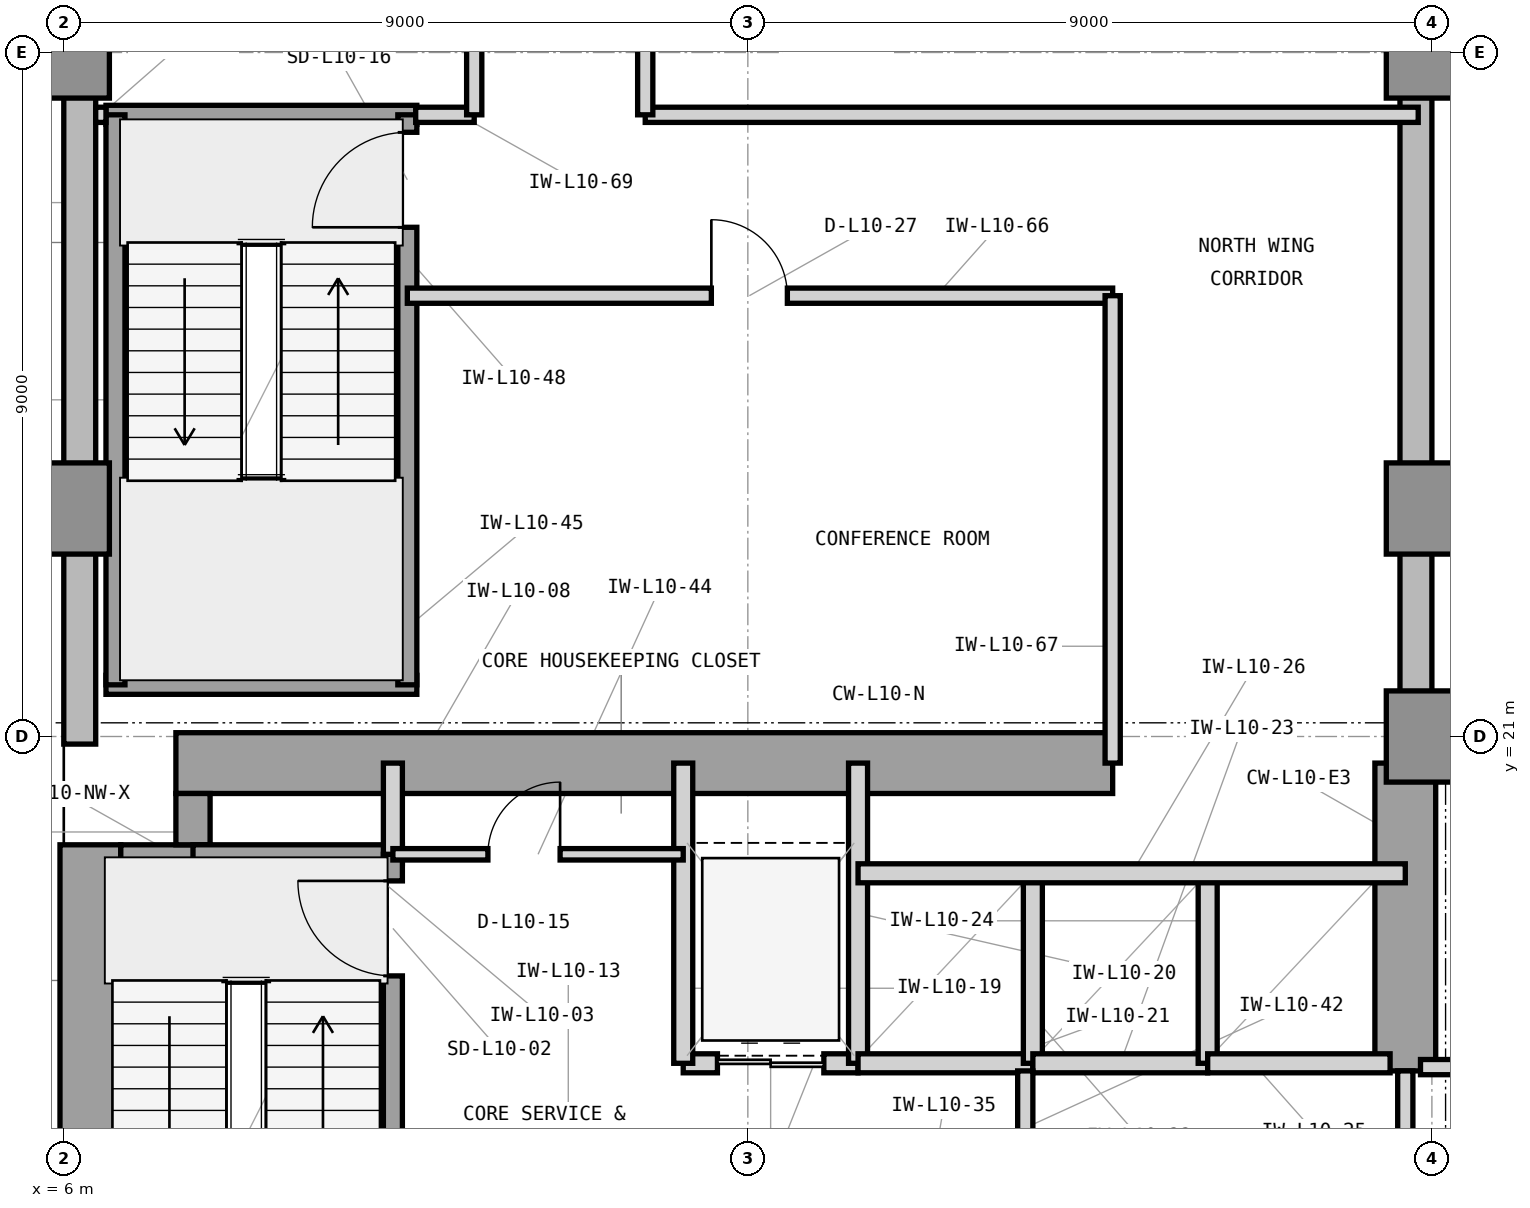
"""IFC4 building model, lengths in metres.
Left out: names, types, materials, properties, quantities, classifications, styles, units other than length and angle.
Written with IfcOpenShell. Run it as: python <this file> out.ifc"""

import sys

from ifc_helpers import new_model, si_unit, direction, frame, frame_2d, origin, origin_2d, place, context, subcontext, project, spatial, rectangle, extrude, element, fill, save


model = new_model("IFC4")
c1 = context("Model", 3, precision=1e-05, world=origin(), true_north=direction((0.0, 1.0)))
c2 = subcontext(c1, "Body", "Model", "MODEL_VIEW")
j1 = project(units=[si_unit("LENGTHUNIT", "METRE"), si_unit("PLANEANGLEUNIT", "RADIAN")], contexts=[c1])
p1 = place(None, origin())
s1 = spatial("IfcSite", under=j1, at=p1, CompositionType="ELEMENT")
p2 = place(p1, origin())
s2 = spatial("IfcBuilding", under=s1, at=p2, CompositionType="ELEMENT")
p3 = place(p2, frame((0.0, 0.0, 46.8)))
s3 = spatial("IfcBuildingStorey", under=s2, at=p3, CompositionType="ELEMENT", Elevation=46.8)
p4 = place(p3, frame((6.35, 4.425, 0.0), z_axis=(0.0, 0.0, 1.0), x_axis=(0.0, 1.0, 0.0)))
e1 = element("IfcWall", 1, at=p4, inside=s3, PredefinedType="SHEAR", context=c2, shape_type="SweptSolid", body=[
    extrude(rectangle(XDim=15.15, YDim=0.8, at=frame_2d((7.575, 0.0))), origin(), (0.0, 0.0, 1.0), 4.2),
])
p5 = place(p3, frame((7.475, 20.65, 0.0), z_axis=(0.0, 0.0, 1.0), x_axis=(1.0, 0.0, 0.0)))
e2 = element("IfcWall", 2, at=p5, inside=s3, PredefinedType="SHEAR", context=c2, shape_type="SweptSolid", body=[
    extrude(rectangle(XDim=12.325, YDim=0.8, at=frame_2d((6.163, 0.0))), origin(), (0.0, 0.0, 1.0), 4.2),
])
p6 = place(p3, frame((23.65, 16.6, 0.0), z_axis=(0.0, 0.0, 1.0), x_axis=(0.0, 1.0, 0.0)))
e3 = element("IfcWall", 3, at=p6, inside=s3, PredefinedType="SHEAR", context=c2, shape_type="SweptSolid", body=[
    extrude(rectangle(XDim=4.05, YDim=0.8, at=frame_2d((2.025, 0.0))), origin(), (0.0, 0.0, 1.0), 4.2),
])
p7 = place(p3, frame((6.75, 19.35, 0.0), z_axis=(0.0, 0.0, 1.0), x_axis=(1.0, 0.0, 0.0)))
e4 = element("IfcWall", 4, at=p7, inside=s3, PredefinedType="SHEAR", context=c2, shape_type="SweptSolid", body=[
    extrude(rectangle(XDim=1.175, YDim=0.45, at=frame_2d((0.587, 0.0))), origin(), (0.0, 0.0, 1.0), 4.2),
])
p8 = place(p3, frame((7.7, 19.575, 0.0), z_axis=(0.0, 0.0, 1.0), x_axis=(0.0, 1.0, 0.0)))
e5 = element("IfcWall", 5, at=p8, inside=s3, PredefinedType="SHEAR", context=c2, shape_type="SweptSolid", body=[
    extrude(rectangle(XDim=0.675, YDim=0.45, at=frame_2d((0.337, 0.0))), origin(), (0.0, 0.0, 1.0), 4.2),
])
for number, where, z_axis, x_axis in (
    (6, (24.0, 21.0, 0.0), (0.0, 0.0, 1.0), (1.0, 0.0, 0.0)),
    (7, (6.0, 24.0, 0.0), (0.0, 0.0, 1.0), (1.0, 0.0, 0.0)),
    (8, (24.0, 24.0, 0.0), (0.0, 0.0, 1.0), (1.0, 0.0, 0.0)),
    (9, (6.0, 30.0, 0.0), (0.0, 0.0, 1.0), (1.0, 0.0, 0.0)),
    (10, (24.0, 30.0, 0.0), (0.0, 0.0, 1.0), (1.0, 0.0, 0.0)),
):
    element("IfcColumn", number, at=place(p3, frame(where, z_axis=z_axis, x_axis=x_axis)), inside=s3, PredefinedType="COLUMN", context=c2, shape_type="SweptSolid", body=[
        extrude(rectangle(XDim=1.2, YDim=1.2, at=origin_2d()), origin(), (0.0, 0.0, 1.0), 4.2),
    ])
p9 = place(p3, frame((64.4, 20.79, 0.0), z_axis=(0.0, 0.0, 1.0), x_axis=(-1.0, 0.0, 0.0)))
e11 = element("IfcWall", 11, at=p9, inside=s3, PredefinedType="STANDARD", context=c2, shape_type="SweptSolid", body=[
    extrude(rectangle(XDim=40.4, YDim=0.42, at=frame_2d((20.2, 0.0))), origin(), (0.0, 0.0, 1.0), 3.98),
])
p10 = place(p9, frame((26.375, 0.0, 0.85)))
e12 = element("IfcOpeningElement", 12, at=p10, cuts=e11, PredefinedType="OPENING", context=c2, shape_type="SweptSolid", body=[
    extrude(rectangle(XDim=2.8, YDim=2.45, at=frame_2d((1.4, 1.225))), frame((0.0, 0.22, 0.0), z_axis=(0.0, -1.0, 0.0), x_axis=(1.0, 0.0, 0.0)), (0.0, 0.0, 1.0), 0.44),
])
p11 = place(p9, frame((38.222, 0.0, 0.85)))
e13 = element("IfcOpeningElement", 13, at=p11, cuts=e11, PredefinedType="OPENING", context=c2, shape_type="SweptSolid", body=[
    extrude(rectangle(XDim=1.2, YDim=2.45, at=frame_2d((0.6, 1.225))), frame((0.0, 0.22, 0.0), z_axis=(0.0, -1.0, 0.0), x_axis=(1.0, 0.0, 0.0)), (0.0, 0.0, 1.0), 0.44),
])
p12 = place(p9, frame((32.536, 0.0, 0.85)))
e14 = element("IfcOpeningElement", 14, at=p12, cuts=e11, PredefinedType="OPENING", context=c2, shape_type="SweptSolid", body=[
    extrude(rectangle(XDim=2.8, YDim=2.45, at=frame_2d((1.4, 1.225))), frame((0.0, 0.22, 0.0), z_axis=(0.0, -1.0, 0.0), x_axis=(1.0, 0.0, 0.0)), (0.0, 0.0, 1.0), 0.44),
])
p13 = place(p9, frame((17.386, 0.0, 0.85)))
e15 = element("IfcOpeningElement", 15, at=p13, cuts=e11, PredefinedType="OPENING", context=c2, shape_type="SweptSolid", body=[
    extrude(rectangle(XDim=2.8, YDim=2.45, at=frame_2d((1.4, 1.225))), frame((0.0, 0.22, 0.0), z_axis=(0.0, -1.0, 0.0), x_axis=(1.0, 0.0, 0.0)), (0.0, 0.0, 1.0), 0.44),
])
p14 = place(p3, frame((23.79, 21.0, 0.0), z_axis=(0.0, 0.0, 1.0), x_axis=(0.0, 1.0, 0.0)))
e16 = element("IfcWall", 16, at=p14, inside=s3, PredefinedType="STANDARD", context=c2, shape_type="SweptSolid", body=[
    extrude(rectangle(XDim=28.4, YDim=0.42, at=frame_2d((14.2, 0.0))), origin(), (0.0, 0.0, 1.0), 3.98),
])
p15 = place(p14, frame((10.433, 0.0, 0.85)))
e17 = element("IfcOpeningElement", 17, at=p15, cuts=e16, PredefinedType="OPENING", context=c2, shape_type="SweptSolid", body=[
    extrude(rectangle(XDim=2.8, YDim=2.45, at=frame_2d((1.4, 1.225))), frame((0.0, 0.22, 0.0), z_axis=(0.0, -1.0, 0.0), x_axis=(1.0, 0.0, 0.0)), (0.0, 0.0, 1.0), 0.44),
])
p16 = place(p14, frame((16.016, 0.0, 0.85)))
e18 = element("IfcOpeningElement", 18, at=p16, cuts=e16, PredefinedType="OPENING", context=c2, shape_type="SweptSolid", body=[
    extrude(rectangle(XDim=1.2, YDim=2.45, at=frame_2d((0.6, 1.225))), frame((0.0, 0.22, 0.0), z_axis=(0.0, -1.0, 0.0), x_axis=(1.0, 0.0, 0.0)), (0.0, 0.0, 1.0), 0.44),
])
p17 = place(p3, frame((6.21, 49.4, 0.0), z_axis=(0.0, 0.0, 1.0), x_axis=(0.0, -1.0, 0.0)))
e19 = element("IfcWall", 19, at=p17, inside=s3, PredefinedType="STANDARD", context=c2, shape_type="SweptSolid", body=[
    extrude(rectangle(XDim=28.5, YDim=0.42, at=frame_2d((14.25, 0.0))), origin(), (0.0, 0.0, 1.0), 3.98),
])
p18 = place(p17, frame((15.225, 0.0, 0.85)))
e20 = element("IfcOpeningElement", 20, at=p18, cuts=e19, PredefinedType="OPENING", context=c2, shape_type="SweptSolid", body=[
    extrude(rectangle(XDim=2.8, YDim=2.45, at=frame_2d((1.4, 1.225))), frame((0.0, 0.22, 0.0), z_axis=(0.0, -1.0, 0.0), x_axis=(1.0, 0.0, 0.0)), (0.0, 0.0, 1.0), 0.44),
])
p19 = place(p3, frame((7.7, 19.45, 0.0), z_axis=(0.0, 0.0, 1.0), x_axis=(1.0, 0.0, 0.0)))
e21 = element("IfcWall", 21, at=p19, inside=s3, PredefinedType="SHEAR", context=c2, shape_type="SweptSolid", body=[
    extrude(rectangle(XDim=2.755, YDim=0.25, at=frame_2d((1.377, 0.0))), origin(), (0.0, 0.0, 1.0), 4.2),
])
p20 = place(p3, frame((10.33, 12.0, 0.0), z_axis=(0.0, 0.0, 1.0), x_axis=(0.0, 1.0, 0.0)))
e22 = element("IfcWall", 22, at=p20, inside=s3, PredefinedType="SHEAR", context=c2, shape_type="SweptSolid", body=[
    extrude(rectangle(XDim=7.45, YDim=0.25, at=frame_2d((3.725, 0.0))), origin(), (0.0, 0.0, 1.0), 4.2),
])
p21 = place(p20, frame((5.85, 0.0, 0.0)))
e23 = element("IfcOpeningElement", 23, at=p21, cuts=e22, PredefinedType="OPENING", context=c2, shape_type="SweptSolid", body=[
    extrude(rectangle(XDim=1.25, YDim=2.2, at=frame_2d((0.625, 1.1))), frame((0.0, 0.135, 0.0), z_axis=(0.0, -1.0, 0.0), x_axis=(1.0, 0.0, 0.0)), (0.0, 0.0, 1.0), 0.27),
])
p22 = place(p3, frame((10.33, 19.45, 0.0), z_axis=(0.0, 0.0, 1.0), x_axis=(0.0, 1.0, 0.0)))
e24 = element("IfcWall", 24, at=p22, inside=s3, PredefinedType="PARTITIONING", context=c2, shape_type="SweptSolid", body=[
    extrude(rectangle(XDim=1.2, YDim=0.25, at=frame_2d((0.6, 0.0))), origin(), (0.0, 0.0, 1.0), 3.114),
])
p23 = place(p3, frame((14.15, 16.7, 0.0), z_axis=(0.0, 0.0, 1.0), x_axis=(1.0, 0.0, 0.0)))
e25 = element("IfcWall", 25, at=p23, inside=s3, PredefinedType="PARTITIONING", context=c2, shape_type="SweptSolid", body=[
    extrude(rectangle(XDim=2.3, YDim=0.25, at=frame_2d((1.15, 0.0))), origin(), (0.0, 0.0, 1.0), 3.426),
])
p24 = place(p23, frame((0.45, 0.0, 0.0)))
e26 = element("IfcOpeningElement", 26, at=p24, cuts=e25, PredefinedType="OPENING", context=c2, shape_type="SweptSolid", body=[
    extrude(rectangle(XDim=1.4, YDim=2.35, at=frame_2d((0.7, 1.175))), frame((0.0, 0.135, 0.0), z_axis=(0.0, -1.0, 0.0), x_axis=(1.0, 0.0, 0.0)), (0.0, 0.0, 1.0), 0.27),
])
for number, where, z_axis, x_axis in (
    (27, (14.15, 16.7, 0.0), (0.0, 0.0, 1.0), (0.0, 1.0, 0.0)),
    (28, (16.45, 16.7, 0.0), (0.0, 0.0, 1.0), (0.0, 1.0, 0.0)),
):
    element("IfcWall", number, at=place(p3, frame(where, z_axis=z_axis, x_axis=x_axis)), inside=s3, PredefinedType="PARTITIONING", context=c2, shape_type="SweptSolid", body=[
        extrude(rectangle(XDim=3.95, YDim=0.25, at=frame_2d((1.975, 0.0))), origin(), (0.0, 0.0, 1.0), 3.97),
    ])
p25 = place(p3, frame((16.45, 16.7, 0.0), z_axis=(0.0, 0.0, 1.0), x_axis=(1.0, 0.0, 0.0)))
e29 = element("IfcWall", 29, at=p25, inside=s3, PredefinedType="PARTITIONING", context=c2, shape_type="SweptSolid", body=[
    extrude(rectangle(XDim=2.3, YDim=0.25, at=frame_2d((1.15, 0.0))), origin(), (0.0, 0.0, 1.0), 3.426),
])
p26 = place(p3, frame((18.75, 16.7, 0.0), z_axis=(0.0, 0.0, 1.0), x_axis=(0.0, 1.0, 0.0)))
e30 = element("IfcWall", 30, at=p26, inside=s3, PredefinedType="PARTITIONING", context=c2, shape_type="SweptSolid", body=[
    extrude(rectangle(XDim=2.5, YDim=0.25, at=frame_2d((1.25, 0.0))), origin(), (0.0, 0.0, 1.0), 3.97),
])
p27 = place(p3, frame((18.75, 16.7, 0.0), z_axis=(0.0, 0.0, 1.0), x_axis=(1.0, 0.0, 0.0)))
e31 = element("IfcWall", 31, at=p27, inside=s3, PredefinedType="PARTITIONING", context=c2, shape_type="SweptSolid", body=[
    extrude(rectangle(XDim=2.3, YDim=0.25, at=frame_2d((1.15, 0.0))), origin(), (0.0, 0.0, 1.0), 3.426),
])
p28 = place(p3, frame((21.05, 16.7, 0.0), z_axis=(0.0, 0.0, 1.0), x_axis=(0.0, 1.0, 0.0)))
e32 = element("IfcWall", 32, at=p28, inside=s3, PredefinedType="PARTITIONING", context=c2, shape_type="SweptSolid", body=[
    extrude(rectangle(XDim=2.5, YDim=0.25, at=frame_2d((1.25, 0.0))), origin(), (0.0, 0.0, 1.0), 3.97),
])
p29 = place(p3, frame((21.05, 16.7, 0.0), z_axis=(0.0, 0.0, 1.0), x_axis=(1.0, 0.0, 0.0)))
e33 = element("IfcWall", 33, at=p29, inside=s3, PredefinedType="PARTITIONING", context=c2, shape_type="SweptSolid", body=[
    extrude(rectangle(XDim=2.4, YDim=0.25, at=frame_2d((1.2, 0.0))), origin(), (0.0, 0.0, 1.0), 3.426),
])
p30 = place(p3, frame((16.45, 19.2, 0.0), z_axis=(0.0, 0.0, 1.0), x_axis=(1.0, 0.0, 0.0)))
e34 = element("IfcWall", 34, at=p30, inside=s3, PredefinedType="PARTITIONING", context=c2, shape_type="SweptSolid", body=[
    extrude(rectangle(XDim=7.2, YDim=0.25, at=frame_2d((3.6, 0.0))), origin(), (0.0, 0.0, 1.0), 3.97),
])
p31 = place(p3, frame((18.65, 13.6, 0.0), z_axis=(0.0, 0.0, 1.0), x_axis=(0.0, 1.0, 0.0)))
e35 = element("IfcWall", 35, at=p31, inside=s3, PredefinedType="PARTITIONING", context=c2, shape_type="SweptSolid", body=[
    extrude(rectangle(XDim=3.0, YDim=0.2, at=frame_2d((1.5, 0.0))), origin(), (0.0, 0.0, 1.0), 3.97),
])
p32 = place(p31, frame((1.02, 0.0, 0.0)))
e36 = element("IfcOpeningElement", 36, at=p32, cuts=e35, PredefinedType="OPENING", context=c2, shape_type="SweptSolid", body=[
    extrude(rectangle(XDim=0.95, YDim=2.1, at=frame_2d((0.475, 1.05))), frame((0.0, 0.11, 0.0), z_axis=(0.0, -1.0, 0.0), x_axis=(1.0, 0.0, 0.0)), (0.0, 0.0, 1.0), 0.22),
])
p33 = place(p3, frame((23.65, 13.6, 0.0), z_axis=(0.0, 0.0, 1.0), x_axis=(0.0, 1.0, 0.0)))
e37 = element("IfcWall", 37, at=p33, inside=s3, PredefinedType="PARTITIONING", context=c2, shape_type="SweptSolid", body=[
    extrude(rectangle(XDim=3.0, YDim=0.2, at=frame_2d((1.5, 0.0))), origin(), (0.0, 0.0, 1.0), 3.97),
])
p34 = place(p3, frame((10.33, 19.45, 0.0), z_axis=(0.0, 0.0, 1.0), x_axis=(1.0, 0.0, 0.0)))
e38 = element("IfcWall", 38, at=p34, inside=s3, PredefinedType="PARTITIONING", context=c2, shape_type="SweptSolid", body=[
    extrude(rectangle(XDim=3.82, YDim=0.15, at=frame_2d((1.91, 0.0))), origin(), (0.0, 0.0, 1.0), 3.97),
])
p35 = place(p34, frame((1.25, 0.0, 0.0)))
e39 = element("IfcOpeningElement", 39, at=p35, cuts=e38, PredefinedType="OPENING", context=c2, shape_type="SweptSolid", body=[
    extrude(rectangle(XDim=0.95, YDim=2.1, at=frame_2d((0.475, 1.05))), frame((0.0, 0.085, 0.0), z_axis=(0.0, -1.0, 0.0), x_axis=(1.0, 0.0, 0.0)), (0.0, 0.0, 1.0), 0.17),
])
for number, where, z_axis, x_axis in (
    (40, (6.555, 21.68, 0.0), (0.0, 0.0, 1.0), (1.0, 0.0, 0.0)),
    (41, (6.555, 29.18, 0.0), (0.0, 0.0, 1.0), (1.0, 0.0, 0.0)),
):
    element("IfcWall", number, at=place(p3, frame(where, z_axis=z_axis, x_axis=x_axis)), inside=s3, PredefinedType="SHEAR", context=c2, shape_type="SweptSolid", body=[
        extrude(rectangle(XDim=4.09, YDim=0.25, at=frame_2d((2.045, 0.0))), origin(), (0.0, 0.0, 1.0), 4.2),
    ])
p36 = place(p3, frame((6.68, 21.68, 0.0), z_axis=(0.0, 0.0, 1.0), x_axis=(0.0, 1.0, 0.0)))
e42 = element("IfcWall", 42, at=p36, inside=s3, PredefinedType="SHEAR", context=c2, shape_type="SweptSolid", body=[
    extrude(rectangle(XDim=7.5, YDim=0.25, at=frame_2d((3.75, 0.0))), origin(), (0.0, 0.0, 1.0), 4.2),
])
p37 = place(p3, frame((10.52, 21.68, 0.0), z_axis=(0.0, 0.0, 1.0), x_axis=(0.0, 1.0, 0.0)))
e43 = element("IfcWall", 43, at=p37, inside=s3, PredefinedType="SHEAR", context=c2, shape_type="SweptSolid", body=[
    extrude(rectangle(XDim=7.5, YDim=0.25, at=frame_2d((3.75, 0.0))), origin(), (0.0, 0.0, 1.0), 4.2),
])
p38 = place(p37, frame((6.02, 0.0, 0.0)))
e44 = element("IfcOpeningElement", 44, at=p38, cuts=e43, PredefinedType="OPENING", context=c2, shape_type="SweptSolid", body=[
    extrude(rectangle(XDim=1.25, YDim=2.2, at=frame_2d((0.625, 1.1))), frame((0.0, 0.135, 0.0), z_axis=(0.0, -1.0, 0.0), x_axis=(1.0, 0.0, 0.0)), (0.0, 0.0, 1.0), 0.27),
])
p39 = place(p3, frame((23.85, 16.65, 0.0), z_axis=(0.0, 0.0, 1.0), x_axis=(1.0, 0.0, 0.0)))
e45 = element("IfcWall", 45, at=p39, inside=s3, PredefinedType="PARTITIONING", context=c2, shape_type="SweptSolid", body=[
    extrude(rectangle(XDim=2.85, YDim=0.2, at=frame_2d((1.425, 0.0))), origin(), (0.0, 0.0, 1.0), 3.97),
])
p40 = place(p39, frame((0.7, 0.0, 0.0)))
e46 = element("IfcOpeningElement", 46, at=p40, cuts=e45, PredefinedType="OPENING", context=c2, shape_type="SweptSolid", body=[
    extrude(rectangle(XDim=1.0, YDim=2.15, at=frame_2d((0.5, 1.075))), frame((0.0, 0.11, 0.0), z_axis=(0.0, -1.0, 0.0), x_axis=(1.0, 0.0, 0.0)), (0.0, 0.0, 1.0), 0.22),
])
p41 = place(p3, frame((10.52, 26.8, 0.0), z_axis=(0.0, 0.0, 1.0), x_axis=(1.0, 0.0, 0.0)))
e47 = element("IfcWall", 47, at=p41, inside=s3, PredefinedType="PARTITIONING", context=c2, shape_type="SweptSolid", body=[
    extrude(rectangle(XDim=9.28, YDim=0.2, at=frame_2d((4.64, 0.0))), origin(), (0.0, 0.0, 1.0), 3.97),
])
p42 = place(p41, frame((4.0, 0.0, 0.0)))
e48 = element("IfcOpeningElement", 48, at=p42, cuts=e47, PredefinedType="OPENING", context=c2, shape_type="SweptSolid", body=[
    extrude(rectangle(XDim=1.0, YDim=2.15, at=frame_2d((0.5, 1.075))), frame((0.0, 0.11, 0.0), z_axis=(0.0, -1.0, 0.0), x_axis=(1.0, 0.0, 0.0)), (0.0, 0.0, 1.0), 0.22),
])
p43 = place(p3, frame((19.8, 20.65, 0.0), z_axis=(0.0, 0.0, 1.0), x_axis=(0.0, 1.0, 0.0)))
e49 = element("IfcWall", 49, at=p43, inside=s3, PredefinedType="PARTITIONING", context=c2, shape_type="SweptSolid", body=[
    extrude(rectangle(XDim=6.15, YDim=0.2, at=frame_2d((3.075, 0.0))), origin(), (0.0, 0.0, 1.0), 3.97),
])
p44 = place(p3, frame((6.42, 29.18, 0.0), z_axis=(0.0, 0.0, 1.0), x_axis=(1.0, 0.0, 0.0)))
e50 = element("IfcWall", 50, at=p44, inside=s3, PredefinedType="PARTITIONING", context=c2, shape_type="SweptSolid", body=[
    extrude(rectangle(XDim=0.135, YDim=0.2, at=frame_2d((0.067, 0.0))), origin(), (0.0, 0.0, 1.0), 3.97),
])
p45 = place(p3, frame((10.63, 29.18, 0.0), z_axis=(0.0, 0.0, 1.0), x_axis=(1.0, 0.0, 0.0)))
e51 = element("IfcWall", 51, at=p45, inside=s3, PredefinedType="PARTITIONING", context=c2, shape_type="SweptSolid", body=[
    extrude(rectangle(XDim=0.77, YDim=0.2, at=frame_2d((0.385, 0.0))), origin(), (0.0, 0.0, 1.0), 3.97),
])
p46 = place(p3, frame((13.65, 29.18, 0.0), z_axis=(0.0, 0.0, 1.0), x_axis=(1.0, 0.0, 0.0)))
e52 = element("IfcWall", 52, at=p46, inside=s3, PredefinedType="PARTITIONING", context=c2, shape_type="SweptSolid", body=[
    extrude(rectangle(XDim=10.17, YDim=0.2, at=frame_2d((5.085, 0.0))), origin(), (0.0, 0.0, 1.0), 3.97),
])
p47 = place(p3, frame((11.4, 29.18, 0.0), z_axis=(0.0, 0.0, 1.0), x_axis=(0.0, 1.0, 0.0)))
e53 = element("IfcWall", 53, at=p47, inside=s3, PredefinedType="PARTITIONING", context=c2, shape_type="SweptSolid", body=[
    extrude(rectangle(XDim=12.82, YDim=0.2, at=frame_2d((6.41, 0.0))), origin(), (0.0, 0.0, 1.0), 3.97),
])
p48 = place(p47, frame((5.91, 0.0, 0.0)))
e54 = element("IfcOpeningElement", 54, at=p48, cuts=e53, PredefinedType="OPENING", context=c2, shape_type="SweptSolid", body=[
    extrude(rectangle(XDim=1.0, YDim=2.15, at=frame_2d((0.5, 1.075))), frame((0.0, 0.11, 0.0), z_axis=(0.0, -1.0, 0.0), x_axis=(1.0, 0.0, 0.0)), (0.0, 0.0, 1.0), 0.22),
])
p49 = place(p3, frame((13.65, 29.18, 0.0), z_axis=(0.0, 0.0, 1.0), x_axis=(0.0, 1.0, 0.0)))
e55 = element("IfcWall", 55, at=p49, inside=s3, PredefinedType="PARTITIONING", context=c2, shape_type="SweptSolid", body=[
    extrude(rectangle(XDim=6.0, YDim=0.2, at=frame_2d((3.0, 0.0))), origin(), (0.0, 0.0, 1.0), 3.97),
])
p50 = place(p49, frame((2.25, 0.0, 0.0)))
e56 = element("IfcOpeningElement", 56, at=p50, cuts=e55, PredefinedType="OPENING", context=c2, shape_type="SweptSolid", body=[
    extrude(rectangle(XDim=1.5, YDim=2.3, at=frame_2d((0.75, 1.15))), frame((0.0, 0.11, 0.0), z_axis=(0.0, -1.0, 0.0), x_axis=(1.0, 0.0, 0.0)), (0.0, 0.0, 1.0), 0.22),
])
p51 = place(p21, origin())
e57 = element("IfcDoor", 57, at=p51, inside=s3, OperationType="SINGLE_SWING_RIGHT", PredefinedType="DOOR", context=c2, shape_type="SweptSolid", body=[
    extrude(rectangle(XDim=1.25, YDim=2.2, at=frame_2d((0.625, 1.1))), frame((0.0, 0.025, 0.0), z_axis=(0.0, -1.0, 0.0), x_axis=(1.0, 0.0, 0.0)), (0.0, 0.0, 1.0), 0.05),
])
fill(e23, e57)
p52 = place(p24, origin())
e58 = element("IfcDoor", 58, at=p52, inside=s3, OperationType="DOUBLE_DOOR_SLIDING", PredefinedType="DOOR", context=c2, shape_type="SweptSolid", body=[
    extrude(rectangle(XDim=1.4, YDim=2.35, at=frame_2d((0.7, 1.175))), frame((0.0, 0.025, 0.0), z_axis=(0.0, -1.0, 0.0), x_axis=(1.0, 0.0, 0.0)), (0.0, 0.0, 1.0), 0.05),
])
fill(e26, e58)
p53 = place(p35, origin())
e59 = element("IfcDoor", 59, at=p53, inside=s3, OperationType="SINGLE_SWING_RIGHT", PredefinedType="DOOR", context=c2, shape_type="SweptSolid", body=[
    extrude(rectangle(XDim=0.95, YDim=2.1, at=frame_2d((0.475, 1.05))), frame((0.0, 0.025, 0.0), z_axis=(0.0, -1.0, 0.0), x_axis=(1.0, 0.0, 0.0)), (0.0, 0.0, 1.0), 0.05),
])
fill(e39, e59)
p54 = place(p38, origin())
e60 = element("IfcDoor", 60, at=p54, inside=s3, OperationType="SINGLE_SWING_LEFT", PredefinedType="DOOR", context=c2, shape_type="SweptSolid", body=[
    extrude(rectangle(XDim=1.25, YDim=2.2, at=frame_2d((0.625, 1.1))), frame((0.0, 0.025, 0.0), z_axis=(0.0, -1.0, 0.0), x_axis=(1.0, 0.0, 0.0)), (0.0, 0.0, 1.0), 0.05),
])
fill(e44, e60)
p55 = place(p42, origin())
e61 = element("IfcDoor", 61, at=p55, inside=s3, OperationType="SINGLE_SWING_LEFT", PredefinedType="DOOR", context=c2, shape_type="SweptSolid", body=[
    extrude(rectangle(XDim=1.0, YDim=2.15, at=frame_2d((0.5, 1.075))), frame((0.0, 0.025, 0.0), z_axis=(0.0, -1.0, 0.0), x_axis=(1.0, 0.0, 0.0)), (0.0, 0.0, 1.0), 0.05),
])
fill(e48, e61)
save(model, sys.argv[1])
